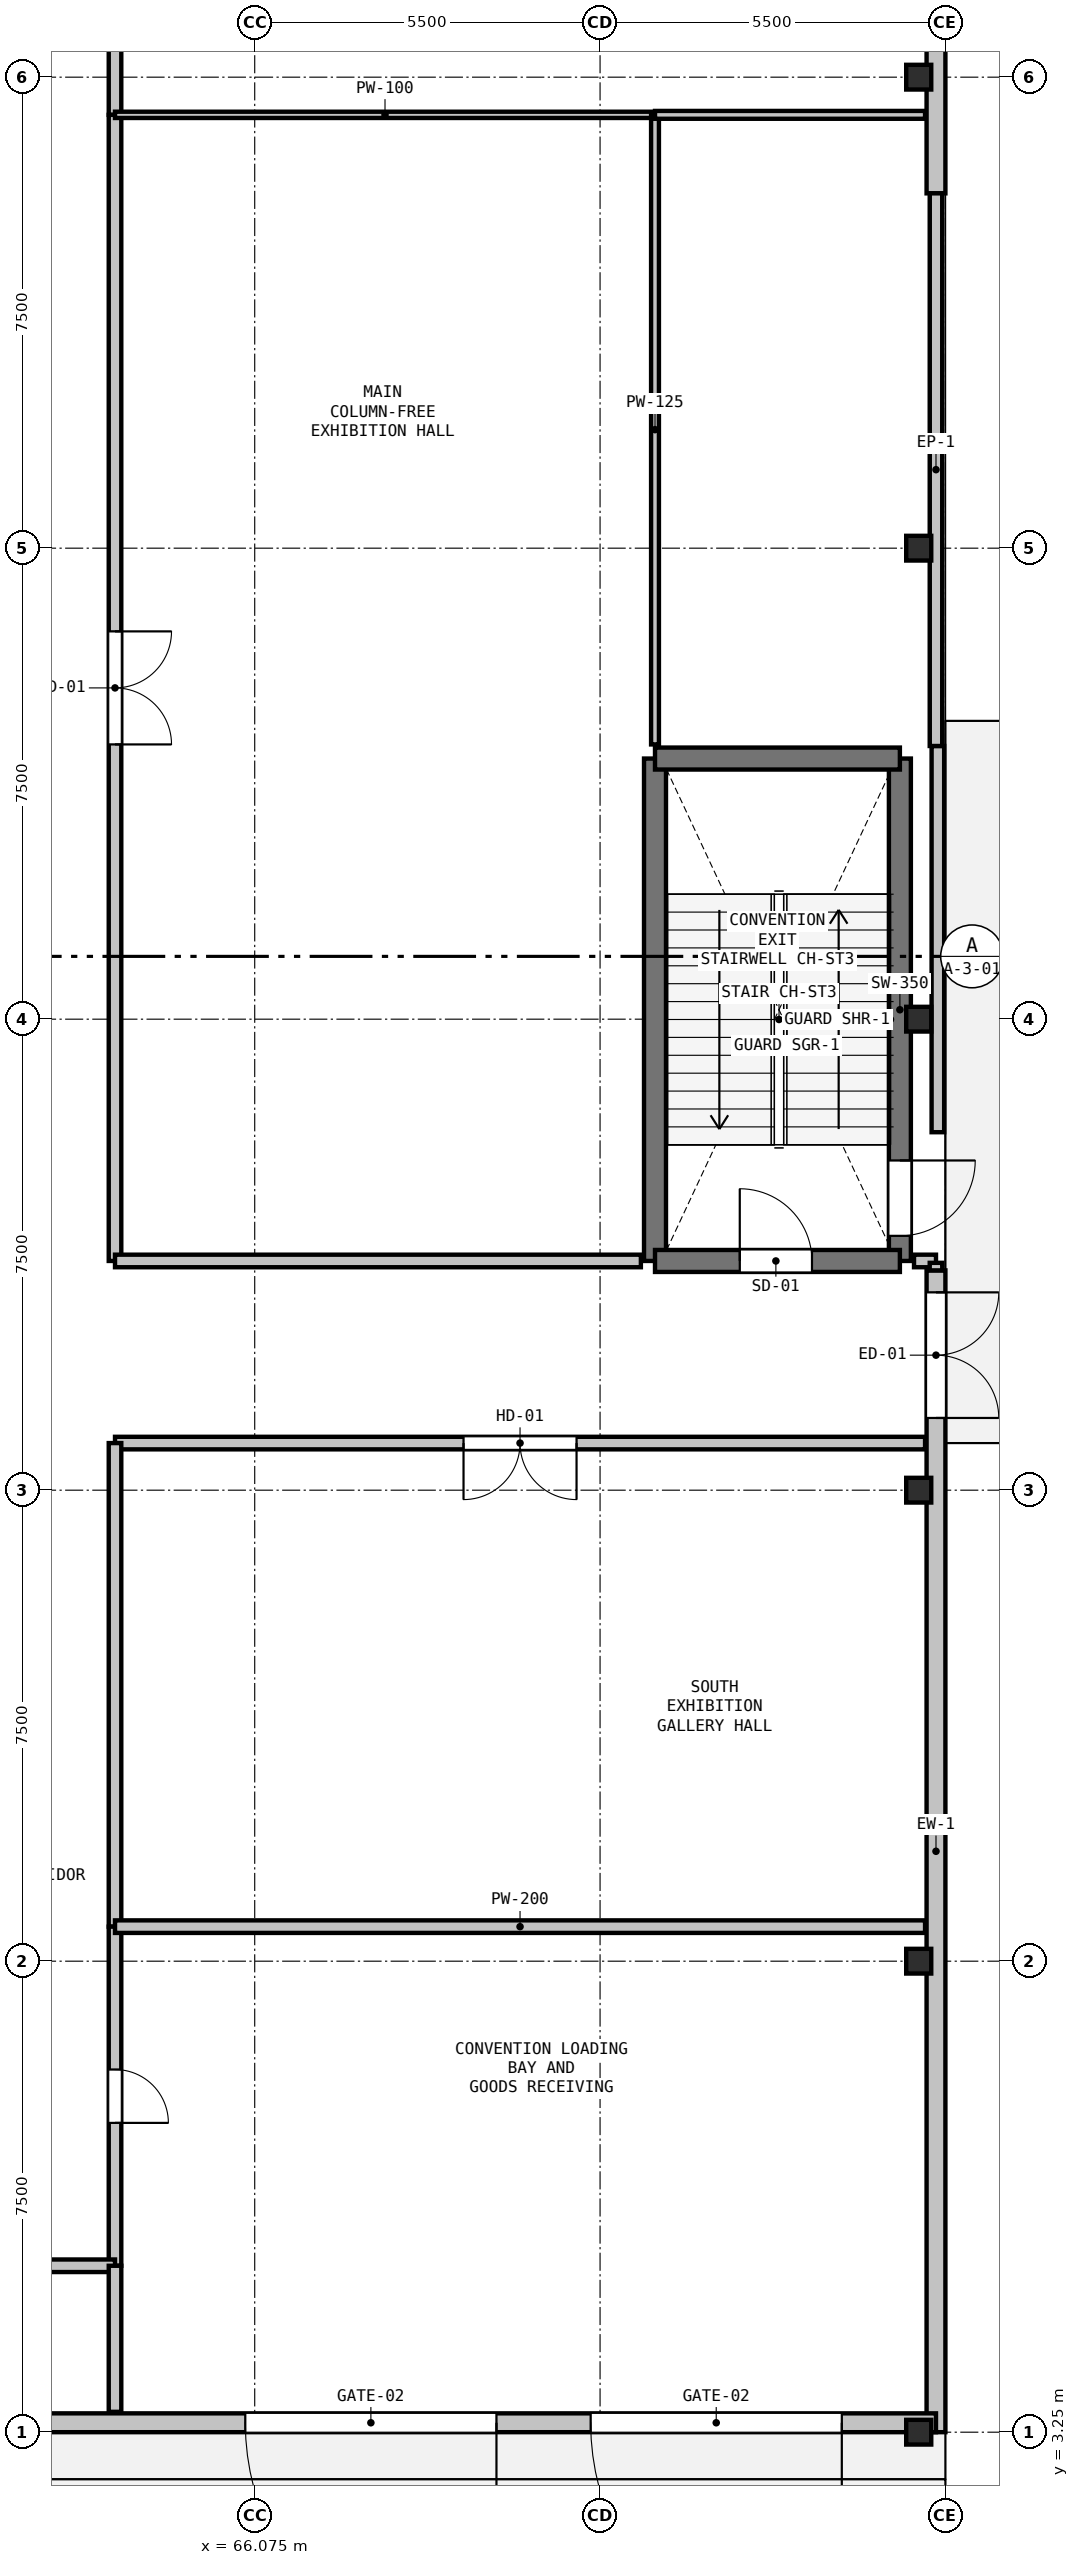
"""IFC4 building model, lengths in metres.
Left out: names, types, materials, properties, quantities, classifications, styles, units other than length and angle.
Written with IfcOpenShell. Run it as: python <this file> out.ifc"""

import sys

from ifc_helpers import new_model, si_unit, direction, frame, frame_2d, origin, origin_2d, place, context, subcontext, project, spatial, rectangle, i_section, extrude, element, fill, save


model = new_model("IFC4")
c1 = context("Model", 3, precision=1e-05, world=origin(), true_north=direction((0.0, 1.0)))
c2 = subcontext(c1, "Body", "Model", "MODEL_VIEW")
j1 = project(units=[si_unit("LENGTHUNIT", "METRE"), si_unit("PLANEANGLEUNIT", "RADIAN")], contexts=[c1])
p1 = place(None, origin())
s1 = spatial("IfcSite", under=j1, at=p1, CompositionType="ELEMENT")
p2 = place(p1, origin())
s2 = spatial("IfcBuilding", under=s1, at=p2, CompositionType="ELEMENT")
p3 = place(p2, origin())
s3 = spatial("IfcBuildingStorey", under=s2, at=p3, CompositionType="ELEMENT", Elevation=0.0)
for number, where, z_axis, x_axis in (
    (1, (76.65, 3.25, 0.0), (0.0, 0.0, 1.0), (1.0, 0.0, 0.0)),
    (2, (76.65, 10.75, 0.0), (0.0, 0.0, 1.0), (1.0, 0.0, 0.0)),
    (3, (76.65, 18.25, 0.0), (0.0, 0.0, 1.0), (1.0, 0.0, 0.0)),
    (4, (76.65, 25.75, 0.0), (0.0, 0.0, 1.0), (1.0, 0.0, 0.0)),
    (5, (76.65, 33.25, 0.0), (0.0, 0.0, 1.0), (1.0, 0.0, 0.0)),
    (6, (76.65, 40.75, 0.0), (0.0, 0.0, 1.0), (1.0, 0.0, 0.0)),
):
    element("IfcColumn", number, at=place(p3, frame(where, z_axis=z_axis, x_axis=x_axis)), inside=s3, PredefinedType="COLUMN", context=c2, shape_type="SweptSolid", body=[
        extrude(i_section(OverallWidth=0.399, OverallDepth=0.394, WebThickness=0.023, FlangeThickness=0.037, at=origin_2d()), origin(), (0.0, 0.0, 1.0), 5.1),
    ])
p4 = place(p3, frame((76.955, 30.1, 0.0), z_axis=(0.0, 0.0, 1.0), x_axis=(0.0, -1.0, 0.0)))
e7 = element("IfcWall", 7, at=p4, inside=s3, PredefinedType="PARAPET", context=c2, shape_type="SweptSolid", body=[
    extrude(rectangle(XDim=6.15, YDim=0.2, at=frame_2d((3.075, 0.0))), origin(), (0.0, 0.0, 1.0), 4.39),
])
p5 = place(p3, frame((76.925, 48.25, 0.0), z_axis=(0.0, 0.0, 1.0), x_axis=(0.0, -1.0, 0.0)))
e8 = element("IfcWall", 8, at=p5, inside=s3, PredefinedType="SOLIDWALL", context=c2, shape_type="SweptSolid", body=[
    extrude(rectangle(XDim=9.35, YDim=0.3, at=frame_2d((4.675, 0.0))), origin(), (0.0, 0.0, 1.0), 4.39),
])
p6 = place(p5, frame((2.2, 0.0, 0.9)))
e9 = element("IfcOpeningElement", 9, at=p6, cuts=e8, PredefinedType="OPENING", context=c2, shape_type="SweptSolid", body=[
    extrude(rectangle(XDim=2.8, YDim=2.4, at=frame_2d((1.4, 1.2))), frame((0.0, 0.16, 0.0), z_axis=(0.0, -1.0, 0.0), x_axis=(1.0, 0.0, 0.0)), (0.0, 0.0, 1.0), 0.32),
])
p7 = place(p3, frame((76.925, 21.75, 0.0), z_axis=(0.0, 0.0, 1.0), x_axis=(0.0, -1.0, 0.0)))
e10 = element("IfcWall", 10, at=p7, inside=s3, PredefinedType="SOLIDWALL", context=c2, shape_type="SweptSolid", body=[
    extrude(rectangle(XDim=18.5, YDim=0.3, at=frame_2d((9.25, 0.0))), origin(), (0.0, 0.0, 1.0), 4.39),
])
p8 = place(p7, frame((0.35, 0.0, 0.0)))
e11 = element("IfcOpeningElement", 11, at=p8, cuts=e10, PredefinedType="OPENING", context=c2, shape_type="SweptSolid", body=[
    extrude(rectangle(XDim=2.0, YDim=2.4, at=frame_2d((1.0, 1.2))), frame((0.0, 0.16, 0.0), z_axis=(0.0, -1.0, 0.0), x_axis=(1.0, 0.0, 0.0)), (0.0, 0.0, 1.0), 0.32),
])
p9 = place(p3, frame((76.925, 3.4, 0.0), z_axis=(0.0, 0.0, 1.0), x_axis=(-1.0, 0.0, 0.0)))
e12 = element("IfcWall", 12, at=p9, inside=s3, PredefinedType="SOLIDWALL", context=c2, shape_type="SweptSolid", body=[
    extrude(rectangle(XDim=17.125, YDim=0.3, at=frame_2d((8.562, 0.0))), origin(), (0.0, 0.0, 1.0), 3.914),
])
p10 = place(p9, frame((1.5, 0.0, 0.0)))
e13 = element("IfcOpeningElement", 13, at=p10, cuts=e12, PredefinedType="OPENING", context=c2, shape_type="SweptSolid", body=[
    extrude(rectangle(XDim=4.0, YDim=3.6, at=frame_2d((2.0, 1.8))), frame((0.0, 0.16, 0.0), z_axis=(0.0, -1.0, 0.0), x_axis=(1.0, 0.0, 0.0)), (0.0, 0.0, 1.0), 0.32),
])
p11 = place(p9, frame((7.0, 0.0, 0.0)))
e14 = element("IfcOpeningElement", 14, at=p11, cuts=e12, PredefinedType="OPENING", context=c2, shape_type="SweptSolid", body=[
    extrude(rectangle(XDim=4.0, YDim=3.6, at=frame_2d((2.0, 1.8))), frame((0.0, 0.16, 0.0), z_axis=(0.0, -1.0, 0.0), x_axis=(1.0, 0.0, 0.0)), (0.0, 0.0, 1.0), 0.32),
])
p12 = place(p3, frame((76.925, 38.9, 0.0), z_axis=(0.0, 0.0, 1.0), x_axis=(0.0, -1.0, 0.0)))
e15 = element("IfcWall", 15, at=p12, inside=s3, PredefinedType="PARAPET", context=c2, shape_type="SweptSolid", body=[
    extrude(rectangle(XDim=8.8, YDim=0.2, at=frame_2d((4.4, 0.0))), origin(), (0.0, 0.0, 1.0), 0.2),
])
p13 = place(p3, frame((76.35, 29.9, 0.0), z_axis=(0.0, 0.0, 1.0), x_axis=(0.0, -1.0, 0.0)))
e16 = element("IfcWall", 16, at=p13, inside=s3, PredefinedType="SHEAR", context=c2, shape_type="SweptSolid", body=[
    extrude(rectangle(XDim=8.0, YDim=0.35, at=frame_2d((4.0, 0.0))), origin(), (0.0, 0.0, 1.0), 4.8),
])
p14 = place(p13, frame((6.4, 0.0, 0.0)))
e17 = element("IfcOpeningElement", 17, at=p14, cuts=e16, PredefinedType="OPENING", context=c2, shape_type="SweptSolid", body=[
    extrude(rectangle(XDim=1.2, YDim=2.2, at=frame_2d((0.6, 1.1))), frame((0.0, 0.185, 0.0), z_axis=(0.0, -1.0, 0.0), x_axis=(1.0, 0.0, 0.0)), (0.0, 0.0, 1.0), 0.37),
])
p15 = place(p3, frame((72.45, 21.9, 0.0), z_axis=(0.0, 0.0, 1.0), x_axis=(0.0, 1.0, 0.0)))
e18 = element("IfcWall", 18, at=p15, inside=s3, PredefinedType="SHEAR", context=c2, shape_type="SweptSolid", body=[
    extrude(rectangle(XDim=8.0, YDim=0.35, at=frame_2d((4.0, 0.0))), origin(), (0.0, 0.0, 1.0), 4.8),
])
p16 = place(p3, frame((72.45, 29.9, 0.0), z_axis=(0.0, 0.0, 1.0), x_axis=(1.0, 0.0, 0.0)))
e19 = element("IfcWall", 19, at=p16, inside=s3, PredefinedType="SHEAR", context=c2, shape_type="SweptSolid", body=[
    extrude(rectangle(XDim=3.9, YDim=0.35, at=frame_2d((1.95, 0.0))), origin(), (0.0, 0.0, 1.0), 4.8),
])
p17 = place(p3, frame((72.45, 21.9, 0.0), z_axis=(0.0, 0.0, 1.0), x_axis=(1.0, 0.0, 0.0)))
e20 = element("IfcWall", 20, at=p17, inside=s3, PredefinedType="SHEAR", context=c2, shape_type="SweptSolid", body=[
    extrude(rectangle(XDim=3.9, YDim=0.35, at=frame_2d((1.95, 0.0))), origin(), (0.0, 0.0, 1.0), 4.8),
])
p18 = place(p17, frame((1.35, 0.0, 0.0)))
e21 = element("IfcOpeningElement", 21, at=p18, cuts=e20, PredefinedType="OPENING", context=c2, shape_type="SweptSolid", body=[
    extrude(rectangle(XDim=1.15, YDim=2.15, at=frame_2d((0.575, 1.075))), frame((0.0, 0.185, 0.0), z_axis=(0.0, -1.0, 0.0), x_axis=(1.0, 0.0, 0.0)), (0.0, 0.0, 1.0), 0.37),
])
p19 = place(p3, frame((63.85, 45.4, 0.0), z_axis=(0.0, 0.0, 1.0), x_axis=(0.0, -1.0, 0.0)))
e22 = element("IfcWall", 22, at=p19, inside=s3, PredefinedType="PARTITIONING", context=c2, shape_type="SweptSolid", body=[
    extrude(rectangle(XDim=5.25, YDim=0.2, at=frame_2d((2.625, 0.0))), origin(), (0.0, 0.0, 1.0), 3.914),
])
p20 = place(p19, frame((2.125, 0.0, 0.0)))
e23 = element("IfcOpeningElement", 23, at=p20, cuts=e22, PredefinedType="OPENING", context=c2, shape_type="SweptSolid", body=[
    extrude(rectangle(XDim=1.0, YDim=2.15, at=frame_2d((0.5, 1.075))), frame((0.0, 0.11, 0.0), z_axis=(0.0, -1.0, 0.0), x_axis=(1.0, 0.0, 0.0)), (0.0, 0.0, 1.0), 0.22),
])
p21 = place(p3, frame((63.85, 40.15, 0.0), z_axis=(0.0, 0.0, 1.0), x_axis=(0.0, -1.0, 0.0)))
e24 = element("IfcWall", 24, at=p21, inside=s3, PredefinedType="PARTITIONING", context=c2, shape_type="SweptSolid", body=[
    extrude(rectangle(XDim=18.25, YDim=0.2, at=frame_2d((9.125, 0.0))), origin(), (0.0, 0.0, 1.0), 3.914),
])
p22 = place(p21, frame((8.225, 0.0, 0.0)))
e25 = element("IfcOpeningElement", 25, at=p22, cuts=e24, PredefinedType="OPENING", context=c2, shape_type="SweptSolid", body=[
    extrude(rectangle(XDim=1.8, YDim=2.2, at=frame_2d((0.9, 1.1))), frame((0.0, 0.11, 0.0), z_axis=(0.0, -1.0, 0.0), x_axis=(1.0, 0.0, 0.0)), (0.0, 0.0, 1.0), 0.22),
])
p23 = place(p3, frame((63.85, 21.9, 0.0), z_axis=(0.0, 0.0, 1.0), x_axis=(1.0, 0.0, 0.0)))
e26 = element("IfcWall", 26, at=p23, inside=s3, PredefinedType="PARTITIONING", context=c2, shape_type="SweptSolid", body=[
    extrude(rectangle(XDim=8.375, YDim=0.2, at=frame_2d((4.188, 0.0))), origin(), (0.0, 0.0, 1.0), 4.356),
])
p24 = place(p3, frame((76.575, 21.9, 0.0), z_axis=(0.0, 0.0, 1.0), x_axis=(1.0, 0.0, 0.0)))
e27 = element("IfcWall", 27, at=p24, inside=s3, PredefinedType="PARTITIONING", context=c2, shape_type="SweptSolid", body=[
    extrude(rectangle(XDim=0.35, YDim=0.2, at=frame_2d((0.175, 0.0))), origin(), (0.0, 0.0, 1.0), 4.39),
])
p25 = place(p3, frame((76.925, 21.87, 0.0), z_axis=(0.0, 0.0, 1.0), x_axis=(0.0, -1.0, 0.0)))
e28 = element("IfcWall", 28, at=p25, inside=s3, PredefinedType="PARTITIONING", context=c2, shape_type="SweptSolid", body=[
    extrude(rectangle(XDim=0.12, YDim=0.2, at=frame_2d((0.06, 0.0))), origin(), (0.0, 0.0, 1.0), 4.39),
])
p26 = place(p3, frame((76.751, 19.0, 0.0), z_axis=(0.0, 0.0, 1.0), x_axis=(-1.0, 0.0, 0.0)))
e29 = element("IfcWall", 29, at=p26, inside=s3, PredefinedType="PARTITIONING", context=c2, shape_type="SweptSolid", body=[
    extrude(rectangle(XDim=12.901, YDim=0.2, at=frame_2d((6.45, 0.0))), origin(), (0.0, 0.0, 1.0), 4.356),
])
p27 = place(p26, frame((5.551, 0.0, 0.0)))
e30 = element("IfcOpeningElement", 30, at=p27, cuts=e29, PredefinedType="OPENING", context=c2, shape_type="SweptSolid", body=[
    extrude(rectangle(XDim=1.8, YDim=2.2, at=frame_2d((0.9, 1.1))), frame((0.0, 0.11, 0.0), z_axis=(0.0, -1.0, 0.0), x_axis=(1.0, 0.0, 0.0)), (0.0, 0.0, 1.0), 0.22),
])
p28 = place(p3, frame((63.85, 19.0, 0.0), z_axis=(0.0, 0.0, 1.0), x_axis=(0.0, -1.0, 0.0)))
e31 = element("IfcWall", 31, at=p28, inside=s3, PredefinedType="PARTITIONING", context=c2, shape_type="SweptSolid", body=[
    extrude(rectangle(XDim=7.7, YDim=0.2, at=frame_2d((3.85, 0.0))), origin(), (0.0, 0.0, 1.0), 3.914),
])
p29 = place(p3, frame((63.85, 11.3, 0.0), z_axis=(0.0, 0.0, 1.0), x_axis=(0.0, -1.0, 0.0)))
e32 = element("IfcWall", 32, at=p29, inside=s3, PredefinedType="PARTITIONING", context=c2, shape_type="SweptSolid", body=[
    extrude(rectangle(XDim=5.4, YDim=0.2, at=frame_2d((2.7, 0.0))), origin(), (0.0, 0.0, 1.0), 3.914),
])
p30 = place(p29, frame((2.275, 0.0, 0.0)))
e33 = element("IfcOpeningElement", 33, at=p30, cuts=e32, PredefinedType="OPENING", context=c2, shape_type="SweptSolid", body=[
    extrude(rectangle(XDim=0.85, YDim=2.1, at=frame_2d((0.425, 1.05))), frame((0.0, 0.11, 0.0), z_axis=(0.0, -1.0, 0.0), x_axis=(1.0, 0.0, 0.0)), (0.0, 0.0, 1.0), 0.22),
])
p31 = place(p3, frame((63.85, 5.9, 0.0), z_axis=(0.0, 0.0, 1.0), x_axis=(-1.0, 0.0, 0.0)))
e34 = element("IfcWall", 34, at=p31, inside=s3, PredefinedType="PARTITIONING", context=c2, shape_type="SweptSolid", body=[
    extrude(rectangle(XDim=1.975, YDim=0.2, at=frame_2d((0.988, 0.0))), origin(), (0.0, 0.0, 1.0), 4.356),
])
p32 = place(p3, frame((63.85, 40.15, 0.0), z_axis=(0.0, 0.0, 1.0), x_axis=(1.0, 0.0, 0.0)))
e35 = element("IfcWall", 35, at=p32, inside=s3, PredefinedType="PARTITIONING", context=c2, shape_type="SweptSolid", body=[
    extrude(rectangle(XDim=8.6, YDim=0.1, at=frame_2d((4.3, 0.0))), origin(), (0.0, 0.0, 1.0), 4.356),
])
p33 = place(p3, frame((72.45, 40.15, 0.0), z_axis=(0.0, 0.0, 1.0), x_axis=(0.0, -1.0, 0.0)))
e36 = element("IfcWall", 36, at=p33, inside=s3, PredefinedType="PARTITIONING", context=c2, shape_type="SweptSolid", body=[
    extrude(rectangle(XDim=10.025, YDim=0.125, at=frame_2d((5.012, 0.0))), origin(), (0.0, 0.0, 1.0), 3.914),
])
p34 = place(p3, frame((76.751, 11.3, 0.0), z_axis=(0.0, 0.0, 1.0), x_axis=(-1.0, 0.0, 0.0)))
e37 = element("IfcWall", 37, at=p34, inside=s3, PredefinedType="PARTITIONING", context=c2, shape_type="SweptSolid", body=[
    extrude(rectangle(XDim=12.901, YDim=0.2, at=frame_2d((6.45, 0.0))), origin(), (0.0, 0.0, 1.0), 4.356),
])
p35 = place(p3, frame((63.85, 3.574, 0.0), z_axis=(0.0, 0.0, 1.0), x_axis=(0.0, 1.0, 0.0)))
e38 = element("IfcWall", 38, at=p35, inside=s3, PredefinedType="PARTITIONING", context=c2, shape_type="SweptSolid", body=[
    extrude(rectangle(XDim=2.326, YDim=0.2, at=frame_2d((1.163, 0.0))), origin(), (0.0, 0.0, 1.0), 4.8),
])
p36 = place(p3, frame((76.751, 40.15, 0.0), z_axis=(0.0, 0.0, 1.0), x_axis=(-1.0, 0.0, 0.0)))
e39 = element("IfcWall", 39, at=p36, inside=s3, PredefinedType="PARTITIONING", context=c2, shape_type="SweptSolid", body=[
    extrude(rectangle(XDim=4.301, YDim=0.125, at=frame_2d((2.15, 0.0))), origin(), (0.0, 0.0, 1.0), 4.39),
])
p37 = place(p8, origin())
e40 = element("IfcDoor", 40, at=p37, inside=s3, OperationType="DOUBLE_DOOR_SINGLE_SWING", PredefinedType="DOOR", context=c2, shape_type="SweptSolid", body=[
    extrude(rectangle(XDim=2.0, YDim=2.4, at=frame_2d((1.0, 1.2))), frame((0.0, 0.025, 0.0), z_axis=(0.0, -1.0, 0.0), x_axis=(1.0, 0.0, 0.0)), (0.0, 0.0, 1.0), 0.05),
])
fill(e11, e40)
p38 = place(p10, origin())
e41 = element("IfcDoor", 41, at=p38, inside=s3, OperationType="ROLLINGUP", PredefinedType="GATE", context=c2, shape_type="SweptSolid", body=[
    extrude(rectangle(XDim=4.0, YDim=3.6, at=frame_2d((2.0, 1.8))), frame((0.0, 0.025, 0.0), z_axis=(0.0, -1.0, 0.0), x_axis=(1.0, 0.0, 0.0)), (0.0, 0.0, 1.0), 0.05),
])
fill(e13, e41)
p39 = place(p11, origin())
e42 = element("IfcDoor", 42, at=p39, inside=s3, OperationType="ROLLINGUP", PredefinedType="GATE", context=c2, shape_type="SweptSolid", body=[
    extrude(rectangle(XDim=4.0, YDim=3.6, at=frame_2d((2.0, 1.8))), frame((0.0, 0.025, 0.0), z_axis=(0.0, -1.0, 0.0), x_axis=(1.0, 0.0, 0.0)), (0.0, 0.0, 1.0), 0.05),
])
fill(e14, e42)
p40 = place(p18, origin())
e43 = element("IfcDoor", 43, at=p40, inside=s3, OperationType="SINGLE_SWING_LEFT", PredefinedType="DOOR", context=c2, shape_type="SweptSolid", body=[
    extrude(rectangle(XDim=1.15, YDim=2.15, at=frame_2d((0.575, 1.075))), frame((0.0, 0.025, 0.0), z_axis=(0.0, -1.0, 0.0), x_axis=(1.0, 0.0, 0.0)), (0.0, 0.0, 1.0), 0.05),
])
fill(e21, e43)
p41 = place(p14, origin())
e44 = element("IfcDoor", 44, at=p41, inside=s3, OperationType="SINGLE_SWING_LEFT", PredefinedType="DOOR", context=c2, shape_type="SweptSolid", body=[
    extrude(rectangle(XDim=1.2, YDim=2.2, at=frame_2d((0.6, 1.1))), frame((0.0, 0.025, 0.0), z_axis=(0.0, -1.0, 0.0), x_axis=(1.0, 0.0, 0.0)), (0.0, 0.0, 1.0), 0.05),
])
fill(e17, e44)
p42 = place(p22, origin())
e45 = element("IfcDoor", 45, at=p42, inside=s3, OperationType="DOUBLE_DOOR_SINGLE_SWING", PredefinedType="DOOR", context=c2, shape_type="SweptSolid", body=[
    extrude(rectangle(XDim=1.8, YDim=2.2, at=frame_2d((0.9, 1.1))), frame((0.0, 0.025, 0.0), z_axis=(0.0, -1.0, 0.0), x_axis=(1.0, 0.0, 0.0)), (0.0, 0.0, 1.0), 0.05),
])
fill(e25, e45)
p43 = place(p27, origin())
e46 = element("IfcDoor", 46, at=p43, inside=s3, OperationType="DOUBLE_DOOR_SINGLE_SWING", PredefinedType="DOOR", context=c2, shape_type="SweptSolid", body=[
    extrude(rectangle(XDim=1.8, YDim=2.2, at=frame_2d((0.9, 1.1))), frame((0.0, 0.025, 0.0), z_axis=(0.0, -1.0, 0.0), x_axis=(1.0, 0.0, 0.0)), (0.0, 0.0, 1.0), 0.05),
])
fill(e30, e46)
p44 = place(p30, origin())
e47 = element("IfcDoor", 47, at=p44, inside=s3, OperationType="SINGLE_SWING_RIGHT", PredefinedType="DOOR", context=c2, shape_type="SweptSolid", body=[
    extrude(rectangle(XDim=0.85, YDim=2.1, at=frame_2d((0.425, 1.05))), frame((0.0, 0.025, 0.0), z_axis=(0.0, -1.0, 0.0), x_axis=(1.0, 0.0, 0.0)), (0.0, 0.0, 1.0), 0.05),
])
fill(e33, e47)
save(model, sys.argv[1])
